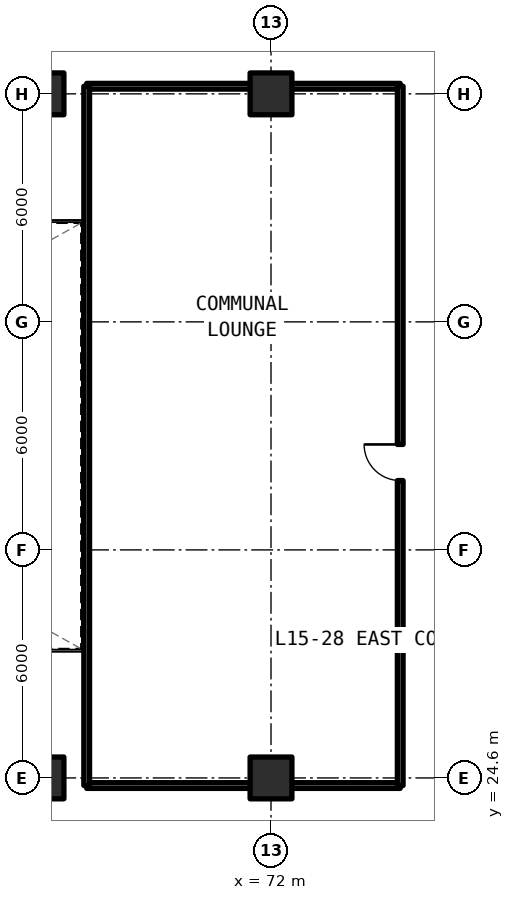
"""IFC4 building model, lengths in metres.
Left out: names, types, materials, properties, quantities, classifications, styles, units other than length and angle.
Written with IfcOpenShell. Run it as: python <this file> out.ifc"""

import sys

from ifc_helpers import new_model, si_unit, direction, frame, frame_2d, origin, origin_2d, place, context, subcontext, project, spatial, rectangle, extrude, element, fill, save


model = new_model("IFC4")
c1 = context("Model", 3, precision=1e-05, world=origin(), true_north=direction((0.0, 1.0)))
c2 = subcontext(c1, "Body", "Model", "MODEL_VIEW")
j1 = project(units=[si_unit("LENGTHUNIT", "METRE"), si_unit("PLANEANGLEUNIT", "RADIAN")], contexts=[c1])
p1 = place(None, origin())
s1 = spatial("IfcSite", under=j1, at=p1, CompositionType="ELEMENT")
p2 = place(p1, origin())
s2 = spatial("IfcBuilding", under=s1, at=p2, CompositionType="ELEMENT")
p3 = place(p2, frame((0.0, 0.0, 55.44)))
s3 = spatial("IfcBuildingStorey", under=s2, at=p3, CompositionType="ELEMENT", Elevation=55.44)
for number, where, z_axis, x_axis in (
    (1, (66.0, 24.6, 0.0), (0.0, 0.0, 1.0), (1.0, 0.0, 0.0)),
    (2, (66.0, 42.6, 0.0), (0.0, 0.0, 1.0), (1.0, 0.0, 0.0)),
    (3, (72.0, 24.6, 0.0), (0.0, 0.0, 1.0), (1.0, 0.0, 0.0)),
    (4, (72.0, 42.6, 0.0), (0.0, 0.0, 1.0), (1.0, 0.0, 0.0)),
):
    element("IfcColumn", number, at=place(p3, frame(where, z_axis=z_axis, x_axis=x_axis)), inside=s3, PredefinedType="COLUMN", context=c2, shape_type="SweptSolid", body=[
        extrude(rectangle(XDim=1.1, YDim=1.1, at=origin_2d()), origin(), (0.0, 0.0, 1.0), 3.3),
    ])
for number, where, z_axis, x_axis in (
    (5, (67.15, 24.4, 0.0), (0.0, 0.0, 1.0), (1.0, 0.0, 0.0)),
    (6, (67.15, 42.8, 0.0), (0.0, 0.0, 1.0), (1.0, 0.0, 0.0)),
):
    element("IfcWall", number, at=place(p3, frame(where, z_axis=z_axis, x_axis=x_axis)), inside=s3, PredefinedType="SOLIDWALL", context=c2, shape_type="SweptSolid", body=[
        extrude(rectangle(XDim=8.25, YDim=0.15, at=frame_2d((4.125, 0.0))), origin(), (0.0, 0.0, 1.0), 2.295),
    ])
p4 = place(p3, frame((67.15, 24.4, 0.0), z_axis=(0.0, 0.0, 1.0), x_axis=(0.0, 1.0, 0.0)))
e7 = element("IfcWall", 7, at=p4, inside=s3, PredefinedType="SOLIDWALL", context=c2, shape_type="SweptSolid", body=[
    extrude(rectangle(XDim=18.4, YDim=0.15, at=frame_2d((9.2, 0.0))), origin(), (0.0, 0.0, 1.0), 2.35),
])
p5 = place(p3, frame((75.4, 24.4, 0.0), z_axis=(0.0, 0.0, 1.0), x_axis=(0.0, 1.0, 0.0)))
e8 = element("IfcWall", 8, at=p5, inside=s3, PredefinedType="SOLIDWALL", context=c2, shape_type="SweptSolid", body=[
    extrude(rectangle(XDim=18.4, YDim=0.15, at=frame_2d((9.2, 0.0))), origin(), (0.0, 0.0, 1.0), 2.35),
])
p6 = place(p5, frame((8.025, 0.0, 0.0)))
e9 = element("IfcOpeningElement", 9, at=p6, cuts=e8, PredefinedType="OPENING", context=c2, shape_type="SweptSolid", body=[
    extrude(rectangle(XDim=0.95, YDim=2.15, at=frame_2d((0.475, 1.075))), frame((0.0, 0.085, 0.0), z_axis=(0.0, -1.0, 0.0), x_axis=(1.0, 0.0, 0.0)), (0.0, 0.0, 1.0), 0.17),
])
p7 = place(p6, origin())
e10 = element("IfcDoor", 10, at=p7, inside=s3, OperationType="SINGLE_SWING_RIGHT", PredefinedType="DOOR", context=c2, shape_type="SweptSolid", body=[
    extrude(rectangle(XDim=0.95, YDim=2.15, at=frame_2d((0.475, 1.075))), frame((0.0, 0.025, 0.0), z_axis=(0.0, -1.0, 0.0), x_axis=(1.0, 0.0, 0.0)), (0.0, 0.0, 1.0), 0.05),
])
fill(e9, e10)
save(model, sys.argv[1])
